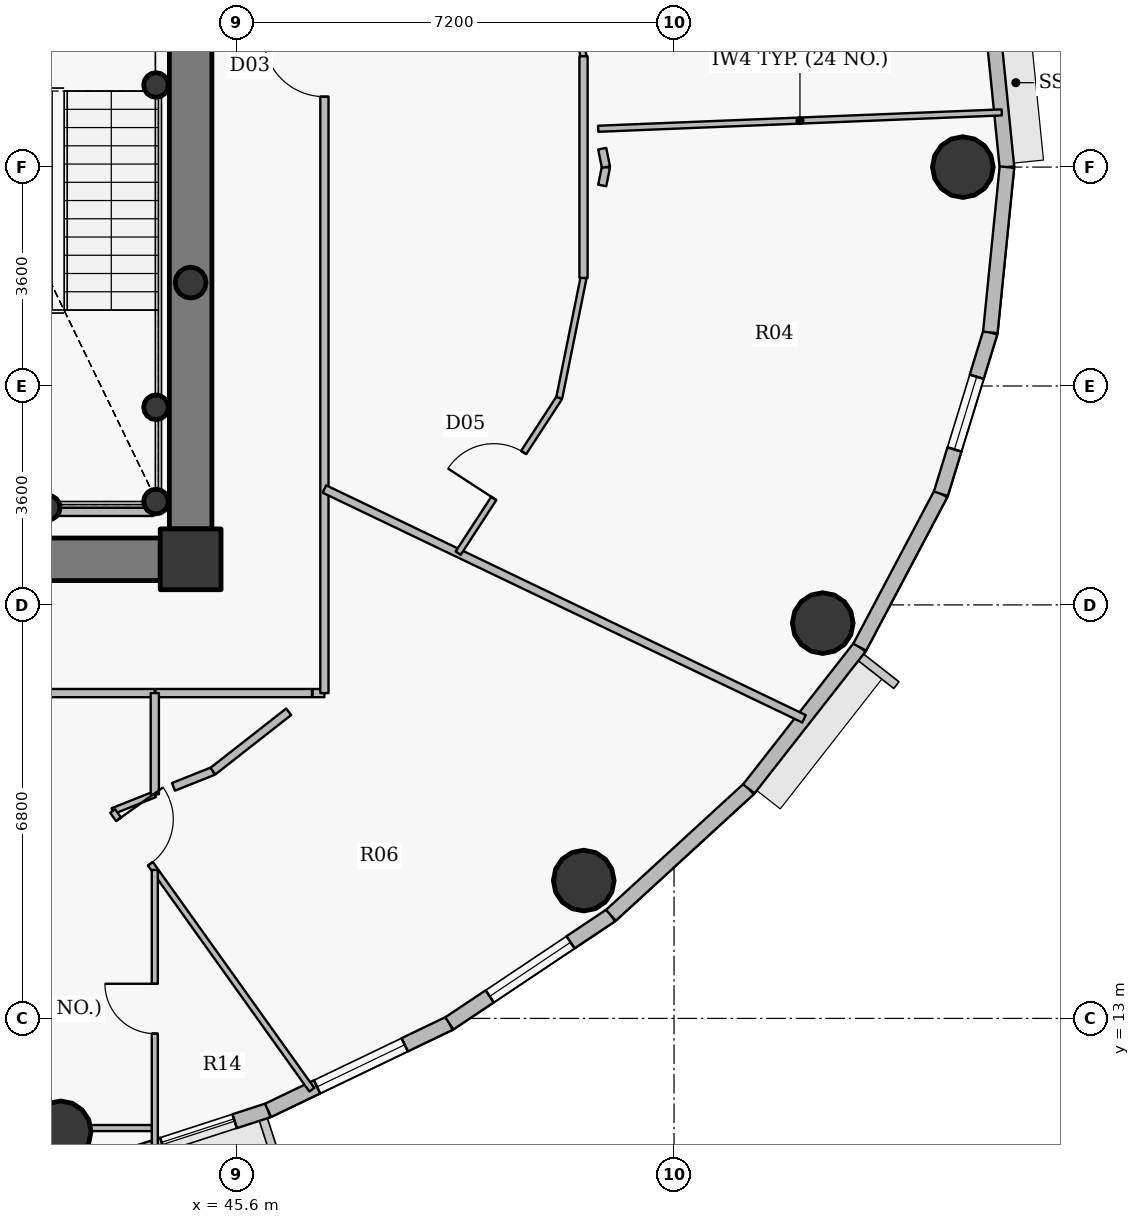
"""IFC4 building model, lengths in metres.
Left out: names, types, materials, properties, quantities, classifications, styles, units other than length and angle.
Written with IfcOpenShell. Run it as: python <this file> out.ifc"""

import sys

from ifc_helpers import new_model, si_unit, direction, frame, frame_2d, origin, origin_2d, place, context, subcontext, project, spatial, rectangle, hollow_circle, extrude, source, transform, mapped, element, fill, save


model = new_model("IFC4")
c1 = context("Model", 3, precision=1e-05, world=origin(), true_north=direction((0.0, 1.0)))
c2 = subcontext(c1, "Body", "Model", "MODEL_VIEW")
j1 = project(units=[si_unit("LENGTHUNIT", "METRE"), si_unit("PLANEANGLEUNIT", "RADIAN")], contexts=[c1])
p1 = place(None, origin())
s1 = spatial("IfcSite", under=j1, at=p1, CompositionType="ELEMENT")
p2 = place(p1, origin())
s2 = spatial("IfcBuilding", under=s1, at=p2, CompositionType="ELEMENT")
p3 = place(p2, frame((0.0, 0.0, 314.25)))
s3 = spatial("IfcBuildingStorey", under=s2, at=p3, CompositionType="ELEMENT", Elevation=314.25)
p4 = place(p3, frame((44.85, 20.55, 0.0), z_axis=(0.0, 0.0, 1.0), x_axis=(1.0, 0.0, 0.0)))
e1 = element("IfcColumn", 1, at=p4, inside=s3, PredefinedType="COLUMN", context=c2, shape_type="SweptSolid", body=[
    extrude(rectangle(XDim=1.0, YDim=1.0, at=origin_2d()), origin(), (0.0, 0.0, 1.0), 3.75),
])
for number, where, z_axis, x_axis in (
    (2, (44.28, 21.5, 0.0), (0.0, 0.0, 1.0), (1.0, 0.0, 0.0)),
    (3, (44.28, 23.05, 0.0), (0.0, 0.0, 1.0), (1.0, 0.0, 0.0)),
    (4, (42.5, 21.4, 0.0), (0.0, 0.0, 1.0), (1.0, 0.0, 0.0)),
    (5, (44.28, 28.35, 0.0), (0.0, 0.0, 1.0), (1.0, 0.0, 0.0)),
):
    element("IfcColumn", number, at=place(p3, frame(where, z_axis=z_axis, x_axis=x_axis)), inside=s3, PredefinedType="COLUMN", context=c2, shape_type="SweptSolid", body=[
        extrude(hollow_circle(Radius=0.203, WallThickness=0.016, at=origin_2d()), origin(), (0.0, 0.0, 1.0), 3.75),
    ])
p5 = place(p3, frame((44.85, 32.95, 0.0), z_axis=(0.0, 0.0, 1.0), x_axis=(0.0, -1.0, 0.0)))
e6 = element("IfcWall", 6, at=p5, inside=s3, PredefinedType="SHEAR", context=c2, shape_type="SweptSolid", body=[
    extrude(rectangle(XDim=11.9, YDim=0.7, at=frame_2d((5.95, 0.0))), origin(), (0.0, 0.0, 1.0), 3.0),
])
p6 = place(p3, frame((44.35, 20.55, 0.0), z_axis=(0.0, 0.0, 1.0), x_axis=(-1.0, 0.0, 0.0)))
e7 = element("IfcWall", 7, at=p6, inside=s3, PredefinedType="SHEAR", context=c2, shape_type="SweptSolid", body=[
    extrude(rectangle(XDim=16.7, YDim=0.7, at=frame_2d((8.35, 0.0))), origin(), (0.0, 0.0, 1.0), 3.0),
])
p7 = place(p6, frame((12.925, 0.0, 0.0)))
e8 = element("IfcOpeningElement", 8, at=p7, cuts=e7, PredefinedType="OPENING", context=c2, shape_type="SweptSolid", body=[
    extrude(rectangle(XDim=1.15, YDim=2.15, at=origin_2d()), frame((0.575, 0.36, 1.075), z_axis=(0.0, -1.0, 0.0), x_axis=(1.0, 0.0, 0.0)), (0.0, 0.0, 1.0), 0.72),
])
p8 = place(p6, frame((9.1, 0.0, 0.0)))
e9 = element("IfcOpeningElement", 9, at=p8, cuts=e7, PredefinedType="OPENING", context=c2, shape_type="SweptSolid", body=[
    extrude(rectangle(XDim=1.15, YDim=2.15, at=origin_2d()), frame((0.575, 0.36, 1.075), z_axis=(0.0, -1.0, 0.0), x_axis=(1.0, 0.0, 0.0)), (0.0, 0.0, 1.0), 0.72),
])
for number, where, z_axis, x_axis in (
    (10, (57.55, 27.0, 0.0), (0.0, 0.0, 1.0), (1.0, 0.0, 0.0)),
    (11, (42.712, 11.142, 0.0), (0.0, 0.0, 1.0), (1.0, 0.0, 0.0)),
    (12, (51.315, 15.267, 0.0), (0.0, 0.0, 1.0), (1.0, 0.0, 0.0)),
    (13, (55.246, 19.5, 0.0), (0.0, 0.0, 1.0), (1.0, 0.0, 0.0)),
):
    element("IfcColumn", number, at=place(p3, frame(where, z_axis=z_axis, x_axis=x_axis)), inside=s3, PredefinedType="COLUMN", context=c2, shape_type="SweptSolid", body=[
        extrude(hollow_circle(Radius=0.5, WallThickness=0.032, at=origin_2d()), origin(), (0.0, 0.0, 1.0), 3.75),
    ])
p9 = place(p3, frame((44.85, 25.1, 0.0), z_axis=(0.0, 0.0, 1.0), x_axis=(1.0, 0.0, 0.0)))
e14 = element("IfcColumn", 14, at=p9, inside=s3, PredefinedType="COLUMN", context=c2, shape_type="SweptSolid", body=[
    extrude(hollow_circle(Radius=0.254, WallThickness=0.02, at=origin_2d()), origin(), (0.0, 0.0, 1.0), 3.75),
])
p10 = place(p3, frame((58.002, 29.719, 0.0), z_axis=(0.0, 0.0, 1.0), x_axis=(0.099972526841, -0.99499019788, 0.0)))
e15 = element("IfcWall", 15, at=p10, inside=s3, PredefinedType="SOLIDWALL", context=c2, shape_type="SweptSolid", body=[
    extrude(rectangle(XDim=2.733, YDim=0.24, at=frame_2d((1.366, 0.0))), origin(), (0.0, 0.0, 1.0), 3.45),
])
p11 = place(p3, frame((46.123, 11.488, 0.0), z_axis=(0.0, 0.0, 1.0), x_axis=(-0.95123136723, -0.308478339592, 0.0)))
e16 = element("IfcWall", 16, at=p11, inside=s3, PredefinedType="SOLIDWALL", context=c2, shape_type="SweptSolid", body=[
    extrude(rectangle(XDim=3.398, YDim=0.24, at=frame_2d((1.699, 0.0))), origin(), (0.0, 0.0, 1.0), 3.45),
])
p12 = place(p11, frame((0.577, 0.0, 0.9)))
e17 = element("IfcOpeningElement", 17, at=p12, cuts=e16, PredefinedType="OPENING", context=c2, shape_type="SweptSolid", body=[
    extrude(rectangle(XDim=1.25, YDim=1.65, at=origin_2d()), frame((0.625, 0.13, 0.825), z_axis=(0.0, -1.0, 0.0), x_axis=(1.0, 0.0, 0.0)), (0.0, 0.0, 1.0), 0.26),
])
p13 = place(p3, frame((49.104, 12.918, 0.0), z_axis=(0.0, 0.0, 1.0), x_axis=(-0.901573741254, -0.43262546051, 0.0)))
e18 = element("IfcWall", 18, at=p13, inside=s3, PredefinedType="SOLIDWALL", context=c2, shape_type="SweptSolid", body=[
    extrude(rectangle(XDim=3.307, YDim=0.24, at=frame_2d((1.653, 0.0))), origin(), (0.0, 0.0, 1.0), 3.45),
])
p14 = place(p13, frame((0.814, 0.0, 0.9)))
e19 = element("IfcOpeningElement", 19, at=p14, cuts=e18, PredefinedType="OPENING", context=c2, shape_type="SweptSolid", body=[
    extrude(rectangle(XDim=1.6, YDim=1.75, at=origin_2d()), frame((0.8, 0.13, 0.875), z_axis=(0.0, -1.0, 0.0), x_axis=(1.0, 0.0, 0.0)), (0.0, 0.0, 1.0), 0.26),
])
p15 = place(p3, frame((51.762, 14.696, 0.0), z_axis=(0.0, 0.0, 1.0), x_axis=(-0.831250592635, -0.55589787933, 0.0)))
e20 = element("IfcWall", 20, at=p15, inside=s3, PredefinedType="SOLIDWALL", context=c2, shape_type="SweptSolid", body=[
    extrude(rectangle(XDim=3.197, YDim=0.24, at=frame_2d((1.599, 0.0))), origin(), (0.0, 0.0, 1.0), 3.45),
])
p16 = place(p15, frame((0.799, 0.0, 0.9)))
e21 = element("IfcOpeningElement", 21, at=p16, cuts=e20, PredefinedType="OPENING", context=c2, shape_type="SweptSolid", body=[
    extrude(rectangle(XDim=1.6, YDim=1.75, at=origin_2d()), frame((0.8, 0.13, 0.875), z_axis=(0.0, -1.0, 0.0), x_axis=(1.0, 0.0, 0.0)), (0.0, 0.0, 1.0), 0.26),
])
p17 = place(p3, frame((54.03, 16.775, 0.0), z_axis=(0.0, 0.0, 1.0), x_axis=(-0.737068506972, -0.675818034703, 0.0)))
e22 = element("IfcWall", 22, at=p17, inside=s3, PredefinedType="SOLIDWALL", context=c2, shape_type="SweptSolid", body=[
    extrude(rectangle(XDim=3.077, YDim=0.24, at=frame_2d((1.539, 0.0))), origin(), (0.0, 0.0, 1.0), 3.45),
])
p18 = place(p3, frame((55.854, 19.105, 0.0), z_axis=(0.0, 0.0, 1.0), x_axis=(-0.616337186556, -0.787482363275, 0.0)))
e23 = element("IfcWall", 23, at=p18, inside=s3, PredefinedType="SOLIDWALL", context=c2, shape_type="SweptSolid", body=[
    extrude(rectangle(XDim=2.958, YDim=0.24, at=frame_2d((1.479, 0.0))), origin(), (0.0, 0.0, 1.0), 3.45),
])
p19 = place(p3, frame((57.188, 21.628, 0.0), z_axis=(0.0, 0.0, 1.0), x_axis=(-0.467628269026, -0.883925224218, 0.0)))
e24 = element("IfcWall", 24, at=p19, inside=s3, PredefinedType="SOLIDWALL", context=c2, shape_type="SweptSolid", body=[
    extrude(rectangle(XDim=2.854, YDim=0.24, at=frame_2d((1.427, 0.0))), origin(), (0.0, 0.0, 1.0), 3.45),
])
p20 = place(p3, frame((58.002, 24.281, 0.0), z_axis=(0.0, 0.0, 1.0), x_axis=(-0.2931213403, -0.956075248012, 0.0)))
e25 = element("IfcWall", 25, at=p20, inside=s3, PredefinedType="SOLIDWALL", context=c2, shape_type="SweptSolid", body=[
    extrude(rectangle(XDim=2.775, YDim=0.24, at=frame_2d((1.388, 0.0))), origin(), (0.0, 0.0, 1.0), 3.45),
])
p21 = place(p20, frame((0.763, 0.0, 0.9)))
e26 = element("IfcOpeningElement", 26, at=p21, cuts=e25, PredefinedType="OPENING", context=c2, shape_type="SweptSolid", body=[
    extrude(rectangle(XDim=1.25, YDim=1.65, at=origin_2d()), frame((0.625, 0.13, 0.825), z_axis=(0.0, -1.0, 0.0), x_axis=(1.0, 0.0, 0.0)), (0.0, 0.0, 1.0), 0.26),
])
p22 = place(p3, frame((58.275, 27.0, 0.0), z_axis=(0.0, 0.0, 1.0), x_axis=(-0.099972526841, -0.99499019788, 0.0)))
e27 = element("IfcWall", 27, at=p22, inside=s3, PredefinedType="SOLIDWALL", context=c2, shape_type="SweptSolid", body=[
    extrude(rectangle(XDim=2.733, YDim=0.24, at=frame_2d((1.366, 0.0))), origin(), (0.0, 0.0, 1.0), 3.45),
])
p23 = place(p3, frame((24.95, 18.35, 0.0), z_axis=(0.0, 0.0, 1.0), x_axis=(1.0, 0.0, 0.0)))
e28 = element("IfcWall", 28, at=p23, inside=s3, PredefinedType="PARTITIONING", context=c2, shape_type="SweptSolid", body=[
    extrude(rectangle(XDim=19.311, YDim=0.135, at=frame_2d((9.655, 0.0))), origin(), (0.0, 0.0, 1.0), 2.985),
])
p24 = place(p23, frame((9.319, 0.0, 0.0)))
e29 = element("IfcOpeningElement", 29, at=p24, cuts=e28, PredefinedType="OPENING", context=c2, shape_type="SweptSolid", body=[
    extrude(rectangle(XDim=1.0, YDim=2.15, at=origin_2d()), frame((0.5, 0.078, 1.075), z_axis=(0.0, -1.0, 0.0), x_axis=(1.0, 0.0, 0.0)), (0.0, 0.0, 1.0), 0.155),
])
p25 = place(p3, frame((37.857, 11.197, 0.0), z_axis=(0.0, 0.0, 1.0), x_axis=(1.0, 0.0, 0.0)))
e30 = element("IfcWall", 30, at=p25, inside=s3, PredefinedType="PARTITIONING", context=c2, shape_type="SweptSolid", body=[
    extrude(rectangle(XDim=6.404, YDim=0.1, at=frame_2d((3.202, 0.0))), origin(), (0.0, 0.0, 1.0), 2.935),
])
p26 = place(p25, frame((1.962, 0.0, 0.0)))
e31 = element("IfcOpeningElement", 31, at=p26, cuts=e30, PredefinedType="OPENING", context=c2, shape_type="SweptSolid", body=[
    extrude(rectangle(XDim=0.9, YDim=2.1, at=origin_2d()), frame((0.45, 0.06, 1.05), z_axis=(0.0, -1.0, 0.0), x_axis=(1.0, 0.0, 0.0)), (0.0, 0.0, 1.0), 0.12),
])
p27 = place(p3, frame((43.568, 16.409, 0.0), z_axis=(0.0, 0.0, 1.0), x_axis=(0.928815226083, 0.370543217178, 0.0)))
e32 = element("IfcWall", 32, at=p27, inside=s3, PredefinedType="PARTITIONING", context=c2, shape_type="SweptSolid", body=[
    extrude(rectangle(XDim=0.745, YDim=0.1, at=frame_2d((0.373, 0.0))), origin(), (0.0, 0.0, 1.0), 3.45),
])
p28 = place(p3, frame((43.568, 16.409, 0.0), z_axis=(0.0, 0.0, 1.0), x_axis=(0.581447306737, -0.81358406418, 0.0)))
e33 = element("IfcWall", 33, at=p28, inside=s3, PredefinedType="PARTITIONING", context=c2, shape_type="SweptSolid", body=[
    extrude(rectangle(XDim=5.632, YDim=0.1, at=frame_2d((2.816, 0.0))), origin(), (0.0, 0.0, 1.0), 2.935),
])
p29 = place(p28, frame((0.165, 0.0, 0.0)))
e34 = element("IfcOpeningElement", 34, at=p29, cuts=e33, PredefinedType="OPENING", context=c2, shape_type="SweptSolid", body=[
    extrude(rectangle(XDim=0.9, YDim=2.1, at=origin_2d()), frame((0.45, 0.06, 1.05), z_axis=(0.0, -1.0, 0.0), x_axis=(1.0, 0.0, 0.0)), (0.0, 0.0, 1.0), 0.12),
])
p30 = place(p3, frame((44.26, 10.878, 0.0), z_axis=(0.0, 0.0, 1.0), x_axis=(0.0, 1.0, 0.0)))
e35 = element("IfcWall", 35, at=p30, inside=s3, PredefinedType="PARTITIONING", context=c2, shape_type="SweptSolid", body=[
    extrude(rectangle(XDim=4.563, YDim=0.1, at=frame_2d((2.281, 0.0))), origin(), (0.0, 0.0, 1.0), 2.935),
])
p31 = place(p30, frame((1.871, 0.0, 0.0)))
e36 = element("IfcOpeningElement", 36, at=p31, cuts=e35, PredefinedType="OPENING", context=c2, shape_type="SweptSolid", body=[
    extrude(rectangle(XDim=0.82, YDim=2.1, at=origin_2d()), frame((0.41, 0.06, 1.05), z_axis=(0.0, -1.0, 0.0), x_axis=(1.0, 0.0, 0.0)), (0.0, 0.0, 1.0), 0.12),
])
p32 = place(p3, frame((46.855, 18.35, 0.0), z_axis=(0.0, 0.0, 1.0), x_axis=(1.0, 0.0, 0.0)))
e37 = element("IfcWall", 37, at=p32, inside=s3, PredefinedType="PARTITIONING", context=c2, shape_type="SweptSolid", body=[
    extrude(rectangle(XDim=0.195, YDim=0.135, at=frame_2d((0.097, 0.0))), origin(), (0.0, 0.0, 1.0), 2.985),
])
p33 = place(p3, frame((47.05, 18.35, 0.0), z_axis=(0.0, 0.0, 1.0), x_axis=(0.0, 1.0, 0.0)))
e38 = element("IfcWall", 38, at=p33, inside=s3, PredefinedType="PARTITIONING", context=c2, shape_type="SweptSolid", body=[
    extrude(rectangle(XDim=17.3, YDim=0.135, at=frame_2d((8.65, 0.0))), origin(), (0.0, 0.0, 1.0), 2.985),
])
p34 = place(p33, frame((9.808, 0.0, 0.0)))
e39 = element("IfcOpeningElement", 39, at=p34, cuts=e38, PredefinedType="OPENING", context=c2, shape_type="SweptSolid", body=[
    extrude(rectangle(XDim=1.0, YDim=2.15, at=origin_2d()), frame((0.5, 0.078, 1.075), z_axis=(0.0, -1.0, 0.0), x_axis=(1.0, 0.0, 0.0)), (0.0, 0.0, 1.0), 0.155),
])
p35 = place(p3, frame((47.05, 21.706, 0.0), z_axis=(0.0, 0.0, 1.0), x_axis=(0.901842087785, -0.432065792096, 0.0)))
e40 = element("IfcWall", 40, at=p35, inside=s3, PredefinedType="PARTITIONING", context=c2, shape_type="SweptSolid", body=[
    extrude(rectangle(XDim=8.747, YDim=0.135, at=frame_2d((4.373, 0.0))), origin(), (0.0, 0.0, 1.0), 2.935),
])
p36 = place(p3, frame((49.25, 20.652, 0.0), z_axis=(0.0, 0.0, 1.0), x_axis=(0.54545856642, 0.838137788385, 0.0)))
e41 = element("IfcWall", 41, at=p36, inside=s3, PredefinedType="PARTITIONING", context=c2, shape_type="SweptSolid", body=[
    extrude(rectangle(XDim=3.047, YDim=0.1, at=frame_2d((1.523, 0.0))), origin(), (0.0, 0.0, 1.0), 2.985),
])
p37 = place(p36, frame((1.073, 0.0, 0.0)))
e42 = element("IfcOpeningElement", 42, at=p37, cuts=e41, PredefinedType="OPENING", context=c2, shape_type="SweptSolid", body=[
    extrude(rectangle(XDim=0.9, YDim=2.1, at=origin_2d()), frame((0.45, 0.06, 1.05), z_axis=(0.0, -1.0, 0.0), x_axis=(1.0, 0.0, 0.0)), (0.0, 0.0, 1.0), 0.12),
])
p38 = place(p3, frame((50.913, 23.206, 0.0), z_axis=(0.0, 0.0, 1.0), x_axis=(0.198192944621, 0.980163025574, 0.0)))
e43 = element("IfcWall", 43, at=p38, inside=s3, PredefinedType="PARTITIONING", context=c2, shape_type="SweptSolid", body=[
    extrude(rectangle(XDim=2.011, YDim=0.1, at=frame_2d((1.006, 0.0))), origin(), (0.0, 0.0, 1.0), 3.45),
])
p39 = place(p3, frame((50.913, 30.794, 0.0), z_axis=(0.0, 0.0, 1.0), x_axis=(0.198192944621, -0.980163025574, 0.0)))
e44 = element("IfcWall", 44, at=p39, inside=s3, PredefinedType="PARTITIONING", context=c2, shape_type="SweptSolid", body=[
    extrude(rectangle(XDim=2.011, YDim=0.1, at=frame_2d((1.006, 0.0))), origin(), (0.0, 0.0, 1.0), 2.985),
])
p40 = place(p3, frame((51.552, 27.63, 0.0), z_axis=(0.0, 0.0, 1.0), x_axis=(0.999179444864, 0.040502308109, 0.0)))
e45 = element("IfcWall", 45, at=p40, inside=s3, PredefinedType="PARTITIONING", context=c2, shape_type="SweptSolid", body=[
    extrude(rectangle(XDim=6.643, YDim=0.1, at=frame_2d((3.321, 0.0))), origin(), (0.0, 0.0, 1.0), 2.935),
])
p41 = place(p3, frame((44.24, 21.33, 0.0), z_axis=(0.0, 0.0, 1.0), x_axis=(-1.0, 0.0, 0.0)))
e46 = element("IfcWall", 46, at=p41, inside=s3, PredefinedType="PARTITIONING", context=c2, shape_type="SweptSolid", body=[
    extrude(rectangle(XDim=2.98, YDim=0.135, at=frame_2d((1.49, 0.0))), origin(), (0.0, 0.0, 1.0), 2.985),
])
p42 = place(p3, frame((46.845, 18.35, 0.0), z_axis=(0.0, 0.0, 1.0), x_axis=(-1.0, 0.0, 0.0)))
e47 = element("IfcWall", 47, at=p42, inside=s3, PredefinedType="PARTITIONING", context=c2, shape_type="SweptSolid", body=[
    extrude(rectangle(XDim=2.575, YDim=0.135, at=frame_2d((1.287, 0.0))), origin(), (0.0, 0.0, 1.0), 3.45),
])
p43 = place(p3, frame((44.36, 20.2, 0.0), z_axis=(0.0, 0.0, 1.0), x_axis=(1.0, 0.0, 0.0)))
e48 = element("IfcWall", 48, at=p43, inside=s3, PredefinedType="PARTITIONING", context=c2, shape_type="SweptSolid", body=[
    extrude(rectangle(XDim=0.84, YDim=0.135, at=frame_2d((0.42, 0.0))), origin(), (0.0, 0.0, 1.0), 2.985),
])
p44 = place(p3, frame((45.2, 20.508, 0.0), z_axis=(0.0, 0.0, 1.0), x_axis=(0.0, 1.0, 0.0)))
e49 = element("IfcWall", 49, at=p44, inside=s3, PredefinedType="PARTITIONING", context=c2, shape_type="SweptSolid", body=[
    extrude(rectangle(XDim=0.532, YDim=0.135, at=frame_2d((0.266, 0.0))), origin(), (0.0, 0.0, 1.0), 3.45),
])
p45 = place(p3, frame((44.26, 18.35, 0.0), z_axis=(0.0, 0.0, 1.0), x_axis=(0.0, -1.0, 0.0)))
e50 = element("IfcWall", 50, at=p45, inside=s3, PredefinedType="PARTITIONING", context=c2, shape_type="SweptSolid", body=[
    extrude(rectangle(XDim=1.665, YDim=0.135, at=frame_2d((0.832, 0.0))), origin(), (0.0, 0.0, 1.0), 3.45),
])
p46 = place(p3, frame((44.568, 16.808, 0.0), z_axis=(0.0, 0.0, 1.0), x_axis=(0.928813825631, 0.370546727576, 0.0)))
e51 = element("IfcWall", 51, at=p46, inside=s3, PredefinedType="PARTITIONING", context=c2, shape_type="SweptSolid", body=[
    extrude(rectangle(XDim=0.698, YDim=0.135, at=frame_2d((0.349, 0.0))), origin(), (0.0, 0.0, 1.0), 3.45),
])
p47 = place(p3, frame((45.217, 17.067, 0.0), z_axis=(0.0, 0.0, 1.0), x_axis=(0.787329157173, 0.616532884982, 0.0)))
e52 = element("IfcWall", 52, at=p47, inside=s3, PredefinedType="PARTITIONING", context=c2, shape_type="SweptSolid", body=[
    extrude(rectangle(XDim=1.582, YDim=0.135, at=frame_2d((0.791, 0.0))), origin(), (0.0, 0.0, 1.0), 3.45),
])
p48 = place(p3, frame((51.311, 28.823, 0.0), z_axis=(0.0, 0.0, 1.0), x_axis=(0.0, -1.0, 0.0)))
e53 = element("IfcWall", 53, at=p48, inside=s3, PredefinedType="PARTITIONING", context=c2, shape_type="SweptSolid", body=[
    extrude(rectangle(XDim=3.645, YDim=0.135, at=frame_2d((1.823, 0.0))), origin(), (0.0, 0.0, 1.0), 2.985),
])
for number, where, z_axis, x_axis in (
    (54, (51.619, 26.698, 0.0), (0.0, 0.0, 1.0), (0.198, 0.98, 0.0)),
    (55, (51.68, 27.0, 0.0), (0.0, 0.0, 1.0), (-0.198, 0.98, 0.0)),
):
    element("IfcWall", number, at=place(p3, frame(where, z_axis=z_axis, x_axis=x_axis)), inside=s3, PredefinedType="PARTITIONING", context=c2, shape_type="SweptSolid", body=[
        extrude(rectangle(XDim=0.308, YDim=0.135, at=frame_2d((0.154, 0.0))), origin(), (0.0, 0.0, 1.0), 2.985),
    ])
m1 = source(origin(), c2, "Body", "SweptSolid", [
    extrude(rectangle(XDim=1.6, YDim=1.75, at=origin_2d()), frame((0.8, 0.03, 0.875), z_axis=(0.0, -1.0, 0.0), x_axis=(1.0, 0.0, 0.0)), (0.0, 0.0, 1.0), 0.06),
])
p49 = place(p14, origin())
e56 = element("IfcWindow", 56, at=p49, inside=s3, PartitioningType="DOUBLE_PANEL_VERTICAL", PredefinedType="WINDOW", context=c2, shape_type="MappedRepresentation", body=[
    mapped(m1, transform((0.0, 0.0, 0.0), x_axis=(1.0, 0.0, 0.0), y_axis=(0.0, 1.0, 0.0), z_axis=(0.0, 0.0, 1.0), scale=1.0)),
])
fill(e19, e56)
p50 = place(p16, origin())
e57 = element("IfcWindow", 57, at=p50, inside=s3, PartitioningType="DOUBLE_PANEL_VERTICAL", PredefinedType="WINDOW", context=c2, shape_type="MappedRepresentation", body=[
    mapped(m1, transform((0.0, 0.0, 0.0), x_axis=(1.0, 0.0, 0.0), y_axis=(0.0, 1.0, 0.0), z_axis=(0.0, 0.0, 1.0), scale=1.0)),
])
fill(e21, e57)
m2 = source(origin(), c2, "Body", "SweptSolid", [
    extrude(rectangle(XDim=1.25, YDim=1.65, at=origin_2d()), frame((0.625, 0.03, 0.825), z_axis=(0.0, -1.0, 0.0), x_axis=(1.0, 0.0, 0.0)), (0.0, 0.0, 1.0), 0.06),
])
p51 = place(p21, origin())
e58 = element("IfcWindow", 58, at=p51, inside=s3, PartitioningType="SINGLE_PANEL", PredefinedType="WINDOW", context=c2, shape_type="MappedRepresentation", body=[
    mapped(m2, transform((0.0, 0.0, 0.0), x_axis=(1.0, 0.0, 0.0), y_axis=(0.0, 1.0, 0.0), z_axis=(0.0, 0.0, 1.0), scale=1.0)),
])
fill(e26, e58)
p52 = place(p12, origin())
e59 = element("IfcWindow", 59, at=p52, inside=s3, PartitioningType="SINGLE_PANEL", PredefinedType="WINDOW", context=c2, shape_type="MappedRepresentation", body=[
    mapped(m2, transform((0.0, 0.0, 0.0), x_axis=(1.0, 0.0, 0.0), y_axis=(0.0, 1.0, 0.0), z_axis=(0.0, 0.0, 1.0), scale=1.0)),
])
fill(e17, e59)
m3 = source(origin(), c2, "Body", "SweptSolid", [
    extrude(rectangle(XDim=0.9, YDim=2.1, at=origin_2d()), frame((0.45, 0.025, 1.05), z_axis=(0.0, -1.0, 0.0), x_axis=(1.0, 0.0, 0.0)), (0.0, 0.0, 1.0), 0.05),
])
p53 = place(p29, origin())
e60 = element("IfcDoor", 60, at=p53, inside=s3, OperationType="SINGLE_SWING_LEFT", PredefinedType="DOOR", context=c2, shape_type="MappedRepresentation", body=[
    mapped(m3, transform((0.0, 0.0, 0.0), x_axis=(1.0, 0.0, 0.0), y_axis=(0.0, 1.0, 0.0), z_axis=(0.0, 0.0, 1.0), scale=1.0)),
])
fill(e34, e60)
m4 = source(origin(), c2, "Body", "SweptSolid", [
    extrude(rectangle(XDim=0.82, YDim=2.1, at=origin_2d()), frame((0.41, 0.025, 1.05), z_axis=(0.0, -1.0, 0.0), x_axis=(1.0, 0.0, 0.0)), (0.0, 0.0, 1.0), 0.05),
])
p54 = place(p31, origin())
e61 = element("IfcDoor", 61, at=p54, inside=s3, OperationType="SINGLE_SWING_RIGHT", PredefinedType="DOOR", context=c2, shape_type="MappedRepresentation", body=[
    mapped(m4, transform((0.0, 0.0, 0.0), x_axis=(1.0, 0.0, 0.0), y_axis=(0.0, 1.0, 0.0), z_axis=(0.0, 0.0, 1.0), scale=1.0)),
])
fill(e36, e61)
m5 = source(origin(), c2, "Body", "SweptSolid", [
    extrude(rectangle(XDim=1.0, YDim=2.15, at=origin_2d()), frame((0.5, 0.025, 1.075), z_axis=(0.0, -1.0, 0.0), x_axis=(1.0, 0.0, 0.0)), (0.0, 0.0, 1.0), 0.05),
])
p55 = place(p34, origin())
e62 = element("IfcDoor", 62, at=p55, inside=s3, OperationType="SINGLE_SWING_RIGHT", PredefinedType="DOOR", context=c2, shape_type="MappedRepresentation", body=[
    mapped(m5, transform((0.0, 0.0, 0.0), x_axis=(1.0, 0.0, 0.0), y_axis=(0.0, 1.0, 0.0), z_axis=(0.0, 0.0, 1.0), scale=1.0)),
])
fill(e39, e62)
p56 = place(p37, origin())
e63 = element("IfcDoor", 63, at=p56, inside=s3, OperationType="SINGLE_SWING_LEFT", PredefinedType="DOOR", context=c2, shape_type="MappedRepresentation", body=[
    mapped(m3, transform((0.0, 0.0, 0.0), x_axis=(1.0, 0.0, 0.0), y_axis=(0.0, 1.0, 0.0), z_axis=(0.0, 0.0, 1.0), scale=1.0)),
])
fill(e42, e63)
save(model, sys.argv[1])
